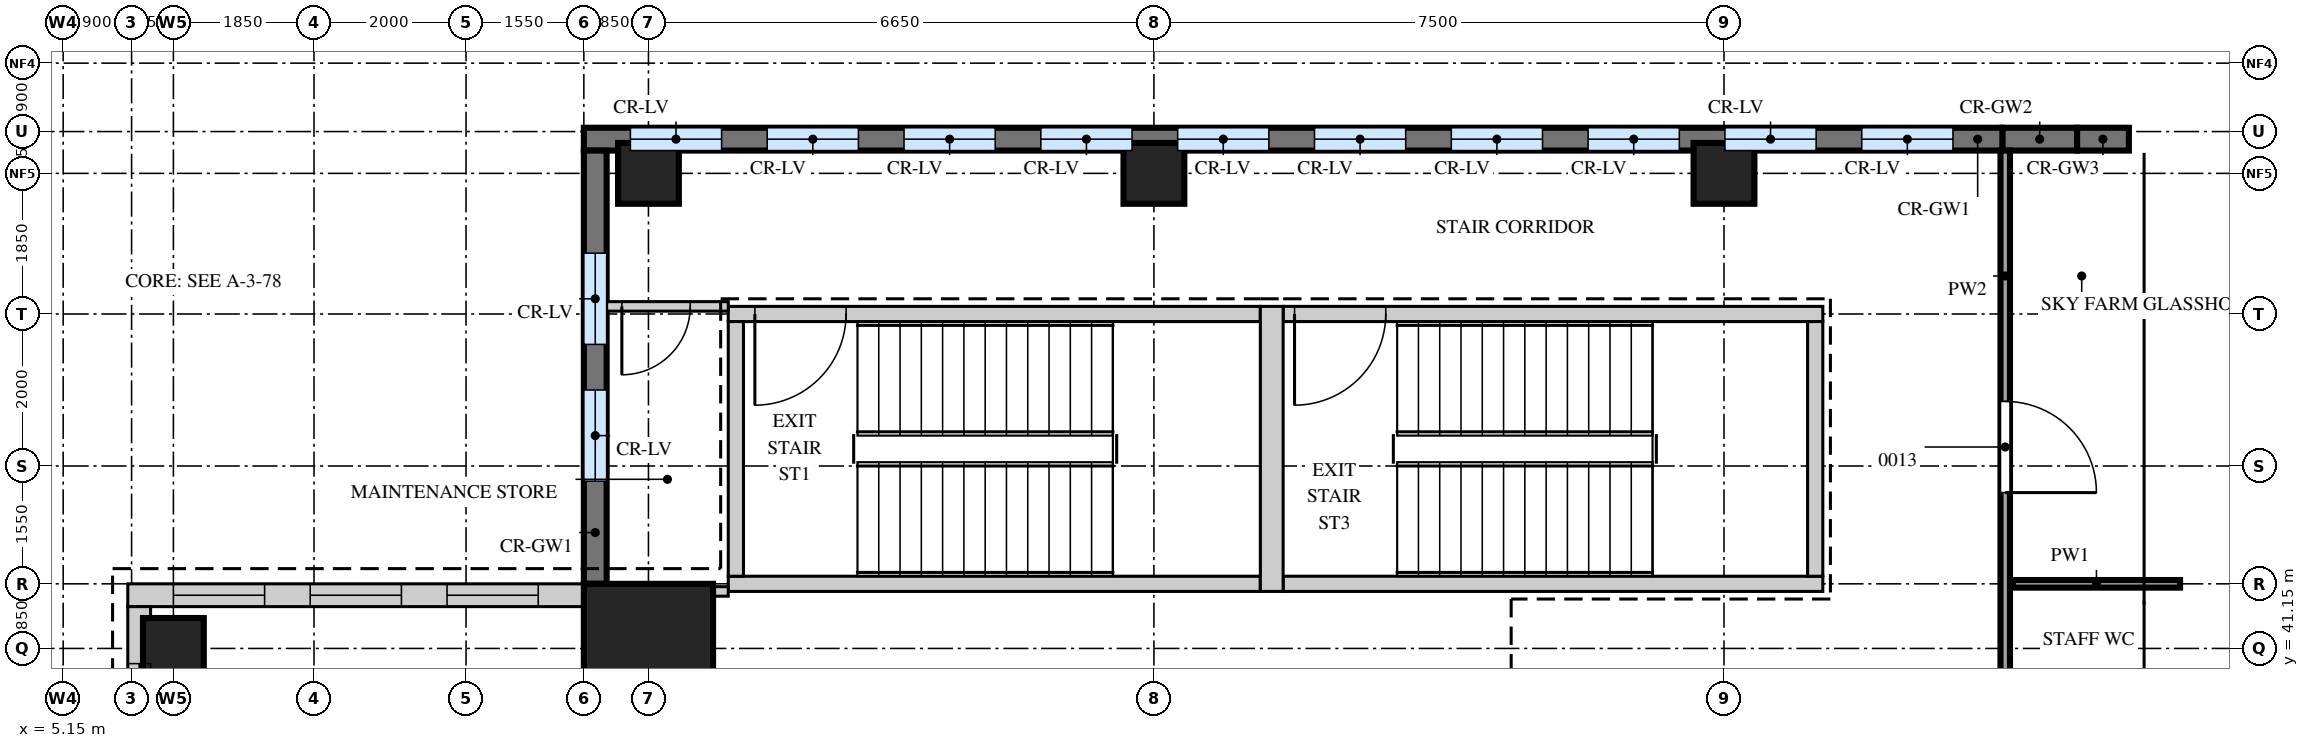
"""IFC4 building model, lengths in metres.
Left out: names, types, materials, properties, quantities, classifications, styles, units other than length and angle.
Written with IfcOpenShell. Run it as: python <this file> out.ifc"""

import sys

from ifc_helpers import new_model, si_unit, direction, frame, frame_2d, origin, origin_2d, place, context, subcontext, project, spatial, rectangle, extrude, source, transform, mapped, element, fill, save


model = new_model("IFC4")
c1 = context("Model", 3, precision=1e-05, world=origin(), true_north=direction((0.0, 1.0)))
c2 = subcontext(c1, "Body", "Model", "MODEL_VIEW")
j1 = project(units=[si_unit("LENGTHUNIT", "METRE"), si_unit("PLANEANGLEUNIT", "RADIAN")], contexts=[c1])
p1 = place(None, origin())
s1 = spatial("IfcSite", under=j1, at=p1, CompositionType="ELEMENT")
p2 = place(p1, origin())
s2 = spatial("IfcBuilding", under=s1, at=p2, CompositionType="ELEMENT")
p3 = place(p2, frame((0.0, 0.0, 339.2)))
s3 = spatial("IfcBuildingStorey", under=s2, at=p3, CompositionType="ELEMENT", Elevation=339.2)
m1 = source(origin(), c2, "Body", "SweptSolid", [
    extrude(rectangle(XDim=7.0, YDim=0.2, at=frame_2d((3.5, 0.0))), origin(), (0.0, 0.0, 1.0), 4.25),
])
p4 = place(p3, frame((13.9, 45.55, 0.0), z_axis=(0.0, 0.0, 1.0), x_axis=(1.0, 0.0, 0.0)))
e1 = element("IfcWall", 1, at=p4, inside=s3, PredefinedType="SHEAR", context=c2, shape_type="MappedRepresentation", body=[
    mapped(m1, transform((0.0, 0.0, 0.0))),
])
m2 = source(origin(), c2, "Body", "SweptSolid", [
    extrude(rectangle(XDim=1.2, YDim=2.1, at=frame_2d((0.6, 1.05))), frame((0.0, 0.11, 0.0), z_axis=(0.0, -1.0, 0.0), x_axis=(1.0, 0.0, 0.0)), (0.0, 0.0, 1.0), 0.22),
])
p5 = place(p4, frame((0.35, 0.0, 0.0)))
e2 = element("IfcOpeningElement", 2, at=p5, cuts=e1, PredefinedType="OPENING", context=c2, shape_type="MappedRepresentation", body=[
    mapped(m2, transform((0.0, 0.0, 0.0))),
])
p6 = place(p3, frame((13.9, 42.0, 0.0), z_axis=(0.0, 0.0, 1.0), x_axis=(1.0, 0.0, 0.0)))
e3 = element("IfcWall", 3, at=p6, inside=s3, PredefinedType="SHEAR", context=c2, shape_type="MappedRepresentation", body=[
    mapped(m1, transform((0.0, 0.0, 0.0))),
])
m3 = source(origin(), c2, "Body", "SweptSolid", [
    extrude(rectangle(XDim=7.1, YDim=0.2, at=frame_2d((3.55, 0.0))), origin(), (0.0, 0.0, 1.0), 4.25),
])
p7 = place(p3, frame((21.2, 45.55, 0.0), z_axis=(0.0, 0.0, 1.0), x_axis=(1.0, 0.0, 0.0)))
e4 = element("IfcWall", 4, at=p7, inside=s3, PredefinedType="SHEAR", context=c2, shape_type="MappedRepresentation", body=[
    mapped(m3, transform((0.0, 0.0, 0.0))),
])
p8 = place(p7, frame((0.15, 0.0, 0.0)))
e5 = element("IfcOpeningElement", 5, at=p8, cuts=e4, PredefinedType="OPENING", context=c2, shape_type="MappedRepresentation", body=[
    mapped(m2, transform((0.0, 0.0, 0.0))),
])
p9 = place(p3, frame((21.2, 42.0, 0.0), z_axis=(0.0, 0.0, 1.0), x_axis=(1.0, 0.0, 0.0)))
e6 = element("IfcWall", 6, at=p9, inside=s3, PredefinedType="SHEAR", context=c2, shape_type="MappedRepresentation", body=[
    mapped(m3, transform((0.0, 0.0, 0.0))),
])
m4 = source(origin(), c2, "Body", "SweptSolid", [
    extrude(rectangle(XDim=3.75, YDim=0.3, at=frame_2d((1.875, 0.0))), origin(), (0.0, 0.0, 1.0), 4.25),
])
p10 = place(p3, frame((21.05, 41.9, 0.0), z_axis=(0.0, 0.0, 1.0), x_axis=(0.0, 1.0, 0.0)))
e7 = element("IfcWall", 7, at=p10, inside=s3, PredefinedType="SHEAR", context=c2, shape_type="MappedRepresentation", body=[
    mapped(m4, transform((0.0, 0.0, 0.0))),
])
m5 = source(origin(), c2, "Body", "SweptSolid", [
    extrude(rectangle(XDim=3.35, YDim=0.2, at=frame_2d((1.675, 0.0))), origin(), (0.0, 0.0, 1.0), 4.25),
])
for number, where, z_axis, x_axis in (
    (8, (14.0, 42.1, 0.0), (0.0, 0.0, 1.0), (0.0, 1.0, 0.0)),
    (9, (28.2, 42.1, 0.0), (0.0, 0.0, 1.0), (0.0, 1.0, 0.0)),
):
    element("IfcWall", number, at=place(p3, frame(where, z_axis=z_axis, x_axis=x_axis)), inside=s3, PredefinedType="SHEAR", context=c2, shape_type="MappedRepresentation", body=[
        mapped(m5, transform((0.0, 0.0, 0.0))),
    ])
m6 = source(origin(), c2, "Body", "SweptSolid", [
    extrude(rectangle(XDim=1.7, YDim=1.7, at=origin_2d()), origin(), (0.0, 0.0, 1.0), 4.5),
])
p11 = place(p3, frame((12.85, 41.15, 0.0), z_axis=(0.0, 0.0, 1.0), x_axis=(1.0, 0.0, 0.0)))
e10 = element("IfcColumn", 10, at=p11, inside=s3, PredefinedType="COLUMN", context=c2, shape_type="MappedRepresentation", body=[
    mapped(m6, transform((0.0, 0.0, 0.0))),
])
m7 = source(origin(), c2, "Body", "SweptSolid", [
    extrude(rectangle(XDim=0.8, YDim=0.8, at=origin_2d()), origin(), (0.0, 0.0, 1.0), 4.5),
])
for number, where, z_axis, x_axis in (
    (11, (12.85, 47.4, 0.0), (0.0, 0.0, 1.0), (1.0, 0.0, 0.0)),
    (12, (19.5, 47.4, 0.0), (0.0, 0.0, 1.0), (1.0, 0.0, 0.0)),
    (13, (27.0, 47.4, 0.0), (0.0, 0.0, 1.0), (1.0, 0.0, 0.0)),
    (14, (6.6, 41.15, 0.0), (0.0, 0.0, 1.0), (1.0, 0.0, 0.0)),
):
    element("IfcColumn", number, at=place(p3, frame(where, z_axis=z_axis, x_axis=x_axis)), inside=s3, PredefinedType="COLUMN", context=c2, shape_type="MappedRepresentation", body=[
        mapped(m7, transform((0.0, 0.0, 0.0))),
    ])
m8 = source(origin(), c2, "Body", "SweptSolid", [
    extrude(rectangle(XDim=0.682, YDim=0.3, at=frame_2d((0.341, 0.0))), origin(), (0.0, 0.0, 1.0), 2.3),
])
p12 = place(p3, frame((32.327, 47.85, 0.0), z_axis=(0.0, 0.0, 1.0), x_axis=(-1.0, 0.0, 0.0)))
e15 = element("IfcWall", 15, at=p12, inside=s3, PredefinedType="SOLIDWALL", context=c2, shape_type="MappedRepresentation", body=[
    mapped(m8, transform((0.0, 0.0, 0.0))),
])
m9 = source(origin(), c2, "Body", "SweptSolid", [
    extrude(rectangle(XDim=0.982, YDim=0.3, at=frame_2d((0.491, 0.0))), origin(), (0.0, 0.0, 1.0), 4.05),
])
p13 = place(p3, frame((31.645, 47.85, 0.0), z_axis=(0.0, 0.0, 1.0), x_axis=(-1.0, 0.0, 0.0)))
e16 = element("IfcWall", 16, at=p13, inside=s3, PredefinedType="SOLIDWALL", context=c2, shape_type="MappedRepresentation", body=[
    mapped(m9, transform((0.0, 0.0, 0.0))),
])
m10 = source(origin(), c2, "Body", "SweptSolid", [
    extrude(rectangle(XDim=18.662, YDim=0.3, at=frame_2d((9.331, 0.0))), origin(), (0.0, 0.0, 1.0), 4.5),
])
p14 = place(p3, frame((30.662, 47.85, 0.0), z_axis=(0.0, 0.0, 1.0), x_axis=(-1.0, 0.0, 0.0)))
e17 = element("IfcWall", 17, at=p14, inside=s3, PredefinedType="SOLIDWALL", context=c2, shape_type="MappedRepresentation", body=[
    mapped(m10, transform((0.0, 0.0, 0.0))),
])
m11 = source(origin(), c2, "Body", "SweptSolid", [
    extrude(rectangle(XDim=1.2, YDim=2.4, at=frame_2d((0.6, 1.2))), frame((0.0, 0.16, 0.0), z_axis=(0.0, -1.0, 0.0), x_axis=(1.0, 0.0, 0.0)), (0.0, 0.0, 1.0), 0.32),
])
p15 = place(p14, frame((0.65, 0.0, 0.9)))
e18 = element("IfcOpeningElement", 18, at=p15, cuts=e17, PredefinedType="OPENING", context=c2, shape_type="MappedRepresentation", body=[
    mapped(m11, transform((0.0, 0.0, 0.0))),
])
p16 = place(p14, frame((2.45, 0.0, 0.9)))
e19 = element("IfcOpeningElement", 19, at=p16, cuts=e17, PredefinedType="OPENING", context=c2, shape_type="MappedRepresentation", body=[
    mapped(m11, transform((0.0, 0.0, 0.0))),
])
p17 = place(p14, frame((4.25, 0.0, 0.9)))
e20 = element("IfcOpeningElement", 20, at=p17, cuts=e17, PredefinedType="OPENING", context=c2, shape_type="MappedRepresentation", body=[
    mapped(m11, transform((0.0, 0.0, 0.0))),
])
p18 = place(p14, frame((6.05, 0.0, 0.9)))
e21 = element("IfcOpeningElement", 21, at=p18, cuts=e17, PredefinedType="OPENING", context=c2, shape_type="MappedRepresentation", body=[
    mapped(m11, transform((0.0, 0.0, 0.0))),
])
p19 = place(p14, frame((7.85, 0.0, 0.9)))
e22 = element("IfcOpeningElement", 22, at=p19, cuts=e17, PredefinedType="OPENING", context=c2, shape_type="MappedRepresentation", body=[
    mapped(m11, transform((0.0, 0.0, 0.0))),
])
p20 = place(p14, frame((9.65, 0.0, 0.9)))
e23 = element("IfcOpeningElement", 23, at=p20, cuts=e17, PredefinedType="OPENING", context=c2, shape_type="MappedRepresentation", body=[
    mapped(m11, transform((0.0, 0.0, 0.0))),
])
p21 = place(p14, frame((11.45, 0.0, 0.9)))
e24 = element("IfcOpeningElement", 24, at=p21, cuts=e17, PredefinedType="OPENING", context=c2, shape_type="MappedRepresentation", body=[
    mapped(m11, transform((0.0, 0.0, 0.0))),
])
p22 = place(p14, frame((13.25, 0.0, 0.9)))
e25 = element("IfcOpeningElement", 25, at=p22, cuts=e17, PredefinedType="OPENING", context=c2, shape_type="MappedRepresentation", body=[
    mapped(m11, transform((0.0, 0.0, 0.0))),
])
p23 = place(p14, frame((15.05, 0.0, 0.9)))
e26 = element("IfcOpeningElement", 26, at=p23, cuts=e17, PredefinedType="OPENING", context=c2, shape_type="MappedRepresentation", body=[
    mapped(m11, transform((0.0, 0.0, 0.0))),
])
p24 = place(p14, frame((16.85, 0.0, 0.9)))
e27 = element("IfcOpeningElement", 27, at=p24, cuts=e17, PredefinedType="OPENING", context=c2, shape_type="MappedRepresentation", body=[
    mapped(m11, transform((0.0, 0.0, 0.0))),
])
m12 = source(origin(), c2, "Body", "SweptSolid", [
    extrude(rectangle(XDim=5.7, YDim=0.3, at=frame_2d((2.85, 0.0))), origin(), (0.0, 0.0, 1.0), 4.5),
])
p25 = place(p3, frame((12.15, 47.7, 0.0), z_axis=(0.0, 0.0, 1.0), x_axis=(0.0, -1.0, 0.0)))
e28 = element("IfcWall", 28, at=p25, inside=s3, PredefinedType="SOLIDWALL", context=c2, shape_type="MappedRepresentation", body=[
    mapped(m12, transform((0.0, 0.0, 0.0))),
])
p26 = place(p25, frame((1.35, 0.0, 0.9)))
e29 = element("IfcOpeningElement", 29, at=p26, cuts=e28, PredefinedType="OPENING", context=c2, shape_type="MappedRepresentation", body=[
    mapped(m11, transform((0.0, 0.0, 0.0))),
])
p27 = place(p25, frame((3.15, 0.0, 0.9)))
e30 = element("IfcOpeningElement", 30, at=p27, cuts=e28, PredefinedType="OPENING", context=c2, shape_type="MappedRepresentation", body=[
    mapped(m11, transform((0.0, 0.0, 0.0))),
])
m13 = source(origin(), c2, "Body", "SweptSolid", [
    extrude(rectangle(XDim=6.0, YDim=0.3, at=frame_2d((3.0, 0.0))), origin(), (0.0, 0.0, 1.0), 4.5),
])
p28 = place(p3, frame((12.0, 41.85, 0.0), z_axis=(0.0, 0.0, 1.0), x_axis=(-1.0, 0.0, 0.0)))
e31 = element("IfcWall", 31, at=p28, inside=s3, PredefinedType="SOLIDWALL", context=c2, shape_type="MappedRepresentation", body=[
    mapped(m13, transform((0.0, 0.0, 0.0))),
])
p29 = place(p28, frame((0.6, 0.0, 0.9)))
e32 = element("IfcOpeningElement", 32, at=p29, cuts=e31, PredefinedType="OPENING", context=c2, shape_type="MappedRepresentation", body=[
    mapped(m11, transform((0.0, 0.0, 0.0))),
])
p30 = place(p28, frame((2.4, 0.0, 0.9)))
e33 = element("IfcOpeningElement", 33, at=p30, cuts=e31, PredefinedType="OPENING", context=c2, shape_type="MappedRepresentation", body=[
    mapped(m11, transform((0.0, 0.0, 0.0))),
])
p31 = place(p28, frame((4.2, 0.0, 0.9)))
e34 = element("IfcOpeningElement", 34, at=p31, cuts=e31, PredefinedType="OPENING", context=c2, shape_type="MappedRepresentation", body=[
    mapped(m11, transform((0.0, 0.0, 0.0))),
])
m14 = source(origin(), c2, "Body", "SweptSolid", [
    extrude(rectangle(XDim=2.7, YDim=0.3, at=frame_2d((1.35, 0.0))), origin(), (0.0, 0.0, 1.0), 4.5),
])
p32 = place(p3, frame((6.15, 41.7, 0.0), z_axis=(0.0, 0.0, 1.0), x_axis=(0.0, -1.0, 0.0)))
e35 = element("IfcWall", 35, at=p32, inside=s3, PredefinedType="SOLIDWALL", context=c2, shape_type="MappedRepresentation", body=[
    mapped(m14, transform((0.0, 0.0, 0.0))),
])
p33 = place(p32, frame((0.75, 0.0, 0.9)))
e36 = element("IfcOpeningElement", 36, at=p33, cuts=e35, PredefinedType="OPENING", context=c2, shape_type="MappedRepresentation", body=[
    mapped(m11, transform((0.0, 0.0, 0.0))),
])
m15 = source(origin(), c2, "Body", "SweptSolid", [
    extrude(rectangle(XDim=8.6, YDim=0.125, at=frame_2d((4.3, 0.0))), origin(), (0.0, 0.0, 1.0), 4.3),
])
p34 = place(p3, frame((30.7, 39.1, 0.0), z_axis=(0.0, 0.0, 1.0), x_axis=(0.0, 1.0, 0.0)))
e37 = element("IfcWall", 37, at=p34, inside=s3, PredefinedType="PARTITIONING", context=c2, shape_type="MappedRepresentation", body=[
    mapped(m15, transform((0.0, 0.0, 0.0))),
])
m16 = source(origin(), c2, "Body", "SweptSolid", [
    extrude(rectangle(XDim=0.9, YDim=2.1, at=frame_2d((0.45, 1.05))), frame((0.0, 0.073, 0.0), z_axis=(0.0, -1.0, 0.0), x_axis=(1.0, 0.0, 0.0)), (0.0, 0.0, 1.0), 0.145),
])
p35 = place(p34, frame((0.8, 0.0, 0.0)))
e38 = element("IfcOpeningElement", 38, at=p35, cuts=e37, PredefinedType="OPENING", context=c2, shape_type="MappedRepresentation", body=[
    mapped(m16, transform((0.0, 0.0, 0.0))),
])
m17 = source(origin(), c2, "Body", "SweptSolid", [
    extrude(rectangle(XDim=1.2, YDim=2.1, at=frame_2d((0.6, 1.05))), frame((0.0, 0.073, 0.0), z_axis=(0.0, -1.0, 0.0), x_axis=(1.0, 0.0, 0.0)), (0.0, 0.0, 1.0), 0.145),
])
p36 = place(p34, frame((4.1, 0.0, 0.0)))
e39 = element("IfcOpeningElement", 39, at=p36, cuts=e37, PredefinedType="OPENING", context=c2, shape_type="MappedRepresentation", body=[
    mapped(m17, transform((0.0, 0.0, 0.0))),
])
m18 = source(origin(), c2, "Body", "SweptSolid", [
    extrude(rectangle(XDim=1.9, YDim=0.125, at=frame_2d((0.95, 0.0))), origin(), (0.0, 0.0, 1.0), 4.3),
])
p37 = place(p3, frame((12.0, 41.9, 0.0), z_axis=(0.0, 0.0, 1.0), x_axis=(1.0, 0.0, 0.0)))
e40 = element("IfcWall", 40, at=p37, inside=s3, PredefinedType="PARTITIONING", context=c2, shape_type="MappedRepresentation", body=[
    mapped(m18, transform((0.0, 0.0, 0.0))),
])
m19 = source(origin(), c2, "Body", "SweptSolid", [
    extrude(rectangle(XDim=2.2, YDim=0.1, at=frame_2d((1.1, 0.0))), origin(), (0.0, 0.0, 1.0), 4.3),
])
p38 = place(p3, frame((30.8, 42.0, 0.0), z_axis=(0.0, 0.0, 1.0), x_axis=(1.0, 0.0, 0.0)))
e41 = element("IfcWall", 41, at=p38, inside=s3, PredefinedType="PARTITIONING", context=c2, shape_type="MappedRepresentation", body=[
    mapped(m19, transform((0.0, 0.0, 0.0))),
])
m20 = source(origin(), c2, "Body", "SweptSolid", [
    extrude(rectangle(XDim=1.6, YDim=0.125, at=frame_2d((0.8, 0.0))), origin(), (0.0, 0.0, 1.0), 4.3),
])
p39 = place(p3, frame((12.3, 45.65, 0.0), z_axis=(0.0, 0.0, 1.0), x_axis=(1.0, 0.0, 0.0)))
e42 = element("IfcWall", 42, at=p39, inside=s3, PredefinedType="PARTITIONING", context=c2, shape_type="MappedRepresentation", body=[
    mapped(m20, transform((0.0, 0.0, 0.0))),
])
p40 = place(p39, frame((0.2, 0.0, 0.0)))
e43 = element("IfcOpeningElement", 43, at=p40, cuts=e42, PredefinedType="OPENING", context=c2, shape_type="MappedRepresentation", body=[
    mapped(m16, transform((0.0, 0.0, 0.0))),
])
m21 = source(origin(), c2, "Body", "SweptSolid", [
    extrude(rectangle(XDim=1.2, YDim=2.4, at=frame_2d((0.6, 1.2))), frame((0.0, 0.03, 0.0), z_axis=(0.0, -1.0, 0.0), x_axis=(1.0, 0.0, 0.0)), (0.0, 0.0, 1.0), 0.06),
])
p41 = place(p15, origin())
e44 = element("IfcWindow", 44, at=p41, inside=s3, PartitioningType="SINGLE_PANEL", PredefinedType="WINDOW", context=c2, shape_type="MappedRepresentation", body=[
    mapped(m21, transform((0.0, 0.0, 0.0))),
])
fill(e18, e44)
p42 = place(p16, origin())
e45 = element("IfcWindow", 45, at=p42, inside=s3, PartitioningType="SINGLE_PANEL", PredefinedType="WINDOW", context=c2, shape_type="MappedRepresentation", body=[
    mapped(m21, transform((0.0, 0.0, 0.0))),
])
fill(e19, e45)
p43 = place(p17, origin())
e46 = element("IfcWindow", 46, at=p43, inside=s3, PartitioningType="SINGLE_PANEL", PredefinedType="WINDOW", context=c2, shape_type="MappedRepresentation", body=[
    mapped(m21, transform((0.0, 0.0, 0.0))),
])
fill(e20, e46)
p44 = place(p18, origin())
e47 = element("IfcWindow", 47, at=p44, inside=s3, PartitioningType="SINGLE_PANEL", PredefinedType="WINDOW", context=c2, shape_type="MappedRepresentation", body=[
    mapped(m21, transform((0.0, 0.0, 0.0))),
])
fill(e21, e47)
p45 = place(p19, origin())
e48 = element("IfcWindow", 48, at=p45, inside=s3, PartitioningType="SINGLE_PANEL", PredefinedType="WINDOW", context=c2, shape_type="MappedRepresentation", body=[
    mapped(m21, transform((0.0, 0.0, 0.0))),
])
fill(e22, e48)
p46 = place(p20, origin())
e49 = element("IfcWindow", 49, at=p46, inside=s3, PartitioningType="SINGLE_PANEL", PredefinedType="WINDOW", context=c2, shape_type="MappedRepresentation", body=[
    mapped(m21, transform((0.0, 0.0, 0.0))),
])
fill(e23, e49)
p47 = place(p21, origin())
e50 = element("IfcWindow", 50, at=p47, inside=s3, PartitioningType="SINGLE_PANEL", PredefinedType="WINDOW", context=c2, shape_type="MappedRepresentation", body=[
    mapped(m21, transform((0.0, 0.0, 0.0))),
])
fill(e24, e50)
p48 = place(p22, origin())
e51 = element("IfcWindow", 51, at=p48, inside=s3, PartitioningType="SINGLE_PANEL", PredefinedType="WINDOW", context=c2, shape_type="MappedRepresentation", body=[
    mapped(m21, transform((0.0, 0.0, 0.0))),
])
fill(e25, e51)
p49 = place(p23, origin())
e52 = element("IfcWindow", 52, at=p49, inside=s3, PartitioningType="SINGLE_PANEL", PredefinedType="WINDOW", context=c2, shape_type="MappedRepresentation", body=[
    mapped(m21, transform((0.0, 0.0, 0.0))),
])
fill(e26, e52)
p50 = place(p24, origin())
e53 = element("IfcWindow", 53, at=p50, inside=s3, PartitioningType="SINGLE_PANEL", PredefinedType="WINDOW", context=c2, shape_type="MappedRepresentation", body=[
    mapped(m21, transform((0.0, 0.0, 0.0))),
])
fill(e27, e53)
p51 = place(p26, origin())
e54 = element("IfcWindow", 54, at=p51, inside=s3, PartitioningType="SINGLE_PANEL", PredefinedType="WINDOW", context=c2, shape_type="MappedRepresentation", body=[
    mapped(m21, transform((0.0, 0.0, 0.0))),
])
fill(e29, e54)
p52 = place(p27, origin())
e55 = element("IfcWindow", 55, at=p52, inside=s3, PartitioningType="SINGLE_PANEL", PredefinedType="WINDOW", context=c2, shape_type="MappedRepresentation", body=[
    mapped(m21, transform((0.0, 0.0, 0.0))),
])
fill(e30, e55)
p53 = place(p29, origin())
e56 = element("IfcWindow", 56, at=p53, inside=s3, PartitioningType="SINGLE_PANEL", PredefinedType="WINDOW", context=c2, shape_type="MappedRepresentation", body=[
    mapped(m21, transform((0.0, 0.0, 0.0))),
])
fill(e32, e56)
p54 = place(p30, origin())
e57 = element("IfcWindow", 57, at=p54, inside=s3, PartitioningType="SINGLE_PANEL", PredefinedType="WINDOW", context=c2, shape_type="MappedRepresentation", body=[
    mapped(m21, transform((0.0, 0.0, 0.0))),
])
fill(e33, e57)
p55 = place(p31, origin())
e58 = element("IfcWindow", 58, at=p55, inside=s3, PartitioningType="SINGLE_PANEL", PredefinedType="WINDOW", context=c2, shape_type="MappedRepresentation", body=[
    mapped(m21, transform((0.0, 0.0, 0.0))),
])
fill(e34, e58)
p56 = place(p33, origin())
e59 = element("IfcWindow", 59, at=p56, inside=s3, PartitioningType="SINGLE_PANEL", PredefinedType="WINDOW", context=c2, shape_type="MappedRepresentation", body=[
    mapped(m21, transform((0.0, 0.0, 0.0))),
])
fill(e36, e59)
m22 = source(origin(), c2, "Body", "SweptSolid", [
    extrude(rectangle(XDim=0.9, YDim=2.1, at=frame_2d((0.45, 1.05))), frame((0.0, 0.025, 0.0), z_axis=(0.0, -1.0, 0.0), x_axis=(1.0, 0.0, 0.0)), (0.0, 0.0, 1.0), 0.05),
])
p57 = place(p40, origin())
e60 = element("IfcDoor", 60, at=p57, inside=s3, OperationType="SINGLE_SWING_LEFT", PredefinedType="DOOR", context=c2, shape_type="MappedRepresentation", body=[
    mapped(m22, transform((0.0, 0.0, 0.0))),
])
fill(e43, e60)
m23 = source(origin(), c2, "Body", "SweptSolid", [
    extrude(rectangle(XDim=1.2, YDim=2.1, at=frame_2d((0.6, 1.05))), frame((0.0, 0.025, 0.0), z_axis=(0.0, -1.0, 0.0), x_axis=(1.0, 0.0, 0.0)), (0.0, 0.0, 1.0), 0.05),
])
p58 = place(p36, origin())
e61 = element("IfcDoor", 61, at=p58, inside=s3, OperationType="SINGLE_SWING_LEFT", PredefinedType="DOOR", context=c2, shape_type="MappedRepresentation", body=[
    mapped(m23, transform((0.0, 0.0, 0.0))),
])
fill(e39, e61)
p59 = place(p5, origin())
e62 = element("IfcDoor", 62, at=p59, inside=s3, OperationType="SINGLE_SWING_LEFT", PredefinedType="DOOR", context=c2, shape_type="MappedRepresentation", body=[
    mapped(m23, transform((0.0, 0.0, 0.0))),
])
fill(e2, e62)
p60 = place(p8, origin())
e63 = element("IfcDoor", 63, at=p60, inside=s3, OperationType="SINGLE_SWING_LEFT", PredefinedType="DOOR", context=c2, shape_type="MappedRepresentation", body=[
    mapped(m23, transform((0.0, 0.0, 0.0))),
])
fill(e5, e63)
save(model, sys.argv[1])
